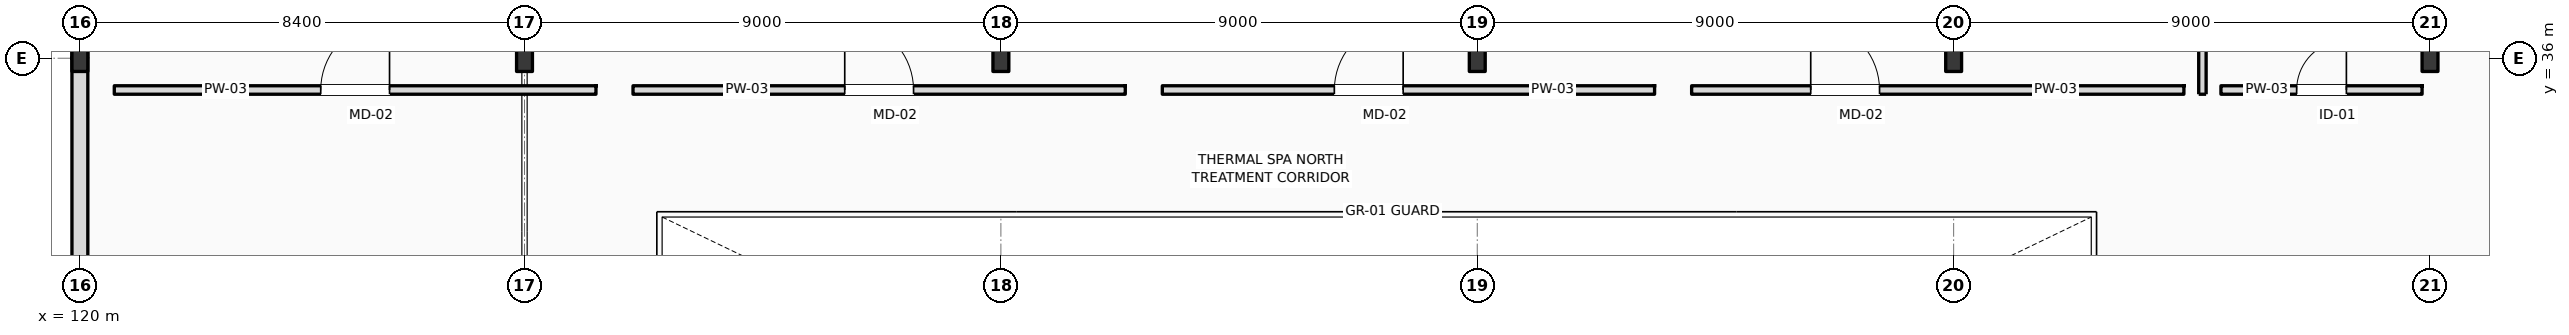
"""IFC4 building model, lengths in metres.
Left out: names, types, materials, properties, quantities, classifications, styles, units other than length and angle.
Written with IfcOpenShell. Run it as: python <this file> out.ifc"""

import sys

from ifc_helpers import new_model, si_unit, direction, frame, frame_2d, origin, origin_2d, place, context, subcontext, project, spatial, rectangle, i_section, extrude, element, fill, save


model = new_model("IFC4")
c1 = context("Model", 3, precision=1e-05, world=origin(), true_north=direction((0.0, 1.0)))
c2 = subcontext(c1, "Body", "Model", "MODEL_VIEW")
j1 = project(units=[si_unit("LENGTHUNIT", "METRE"), si_unit("PLANEANGLEUNIT", "RADIAN")], contexts=[c1])
p1 = place(None, origin())
s1 = spatial("IfcSite", under=j1, at=p1, CompositionType="ELEMENT")
p2 = place(p1, origin())
s2 = spatial("IfcBuilding", under=s1, at=p2, CompositionType="ELEMENT")
p3 = place(p2, frame((0.0, 0.0, 6.0)))
s3 = spatial("IfcBuildingStorey", under=s2, at=p3, CompositionType="ELEMENT", Elevation=6.0)
for number, where, z_axis, x_axis in (
    (1, (120.0, 36.0, 0.0), (0.0, 0.0, 1.0), (1.0, 0.0, 0.0)),
    (2, (128.4, 36.0, 0.0), (0.0, 0.0, 1.0), (1.0, 0.0, 0.0)),
    (3, (137.4, 36.0, 0.0), (0.0, 0.0, 1.0), (1.0, 0.0, 0.0)),
    (4, (146.4, 36.0, 0.0), (0.0, 0.0, 1.0), (1.0, 0.0, 0.0)),
    (5, (155.4, 36.0, 0.0), (0.0, 0.0, 1.0), (1.0, 0.0, 0.0)),
    (6, (164.4, 36.0, 0.0), (0.0, 0.0, 1.0), (1.0, 0.0, 0.0)),
):
    element("IfcColumn", number, at=place(p3, frame(where, z_axis=z_axis, x_axis=x_axis)), inside=s3, PredefinedType="COLUMN", context=c2, shape_type="SweptSolid", body=[
        extrude(i_section(OverallWidth=0.3, OverallDepth=0.5, WebThickness=0.014, FlangeThickness=0.028, FilletRadius=0.027, at=origin_2d()), origin(), (0.0, 0.0, 1.0), 5.4),
    ])
for number, where, z_axis, x_axis in (
    (7, (120.0, 27.0, 0.0), (0.0, 0.0, 1.0), (0.0, 1.0, 0.0)),
    (8, (120.0, 36.0, 0.0), (0.0, 0.0, 1.0), (0.0, 1.0, 0.0)),
):
    element("IfcWall", number, at=place(p3, frame(where, z_axis=z_axis, x_axis=x_axis)), inside=s3, PredefinedType="STANDARD", context=c2, shape_type="SweptSolid", body=[
        extrude(rectangle(XDim=9.0, YDim=0.3, at=frame_2d((4.5, 0.0))), origin(), (0.0, 0.0, 1.0), 4.55),
    ])
p4 = place(p3, frame((120.65, 35.4, 0.0), z_axis=(0.0, 0.0, 1.0), x_axis=(1.0, 0.0, 0.0)))
e9 = element("IfcWall", 9, at=p4, inside=s3, PredefinedType="PARTITIONING", context=c2, shape_type="SweptSolid", body=[
    extrude(rectangle(XDim=9.1, YDim=0.16, at=frame_2d((4.55, 0.0))), origin(), (0.0, 0.0, 1.0), 5.05),
])
p5 = place(p4, frame((3.9, 0.0, 0.0)))
e10 = element("IfcOpeningElement", 10, at=p5, cuts=e9, PredefinedType="OPENING", context=c2, shape_type="SweptSolid", body=[
    extrude(rectangle(XDim=1.3, YDim=2.2, at=frame_2d((0.65, 1.1))), frame((0.0, 0.09, 0.0), z_axis=(0.0, -1.0, 0.0), x_axis=(1.0, 0.0, 0.0)), (0.0, 0.0, 1.0), 0.18),
])
p6 = place(p3, frame((130.45, 35.4, 0.0), z_axis=(0.0, 0.0, 1.0), x_axis=(1.0, 0.0, 0.0)))
e11 = element("IfcWall", 11, at=p6, inside=s3, PredefinedType="PARTITIONING", context=c2, shape_type="SweptSolid", body=[
    extrude(rectangle(XDim=9.3, YDim=0.16, at=frame_2d((4.65, 0.0))), origin(), (0.0, 0.0, 1.0), 5.05),
])
p7 = place(p6, frame((4.0, 0.0, 0.0)))
e12 = element("IfcOpeningElement", 12, at=p7, cuts=e11, PredefinedType="OPENING", context=c2, shape_type="SweptSolid", body=[
    extrude(rectangle(XDim=1.3, YDim=2.2, at=frame_2d((0.65, 1.1))), frame((0.0, 0.09, 0.0), z_axis=(0.0, -1.0, 0.0), x_axis=(1.0, 0.0, 0.0)), (0.0, 0.0, 1.0), 0.18),
])
p8 = place(p3, frame((140.45, 35.4, 0.0), z_axis=(0.0, 0.0, 1.0), x_axis=(1.0, 0.0, 0.0)))
e13 = element("IfcWall", 13, at=p8, inside=s3, PredefinedType="PARTITIONING", context=c2, shape_type="SweptSolid", body=[
    extrude(rectangle(XDim=9.3, YDim=0.16, at=frame_2d((4.65, 0.0))), origin(), (0.0, 0.0, 1.0), 5.05),
])
p9 = place(p8, frame((3.25, 0.0, 0.0)))
e14 = element("IfcOpeningElement", 14, at=p9, cuts=e13, PredefinedType="OPENING", context=c2, shape_type="SweptSolid", body=[
    extrude(rectangle(XDim=1.3, YDim=2.2, at=frame_2d((0.65, 1.1))), frame((0.0, 0.09, 0.0), z_axis=(0.0, -1.0, 0.0), x_axis=(1.0, 0.0, 0.0)), (0.0, 0.0, 1.0), 0.18),
])
p10 = place(p3, frame((150.45, 35.4, 0.0), z_axis=(0.0, 0.0, 1.0), x_axis=(1.0, 0.0, 0.0)))
e15 = element("IfcWall", 15, at=p10, inside=s3, PredefinedType="PARTITIONING", context=c2, shape_type="SweptSolid", body=[
    extrude(rectangle(XDim=9.3, YDim=0.16, at=frame_2d((4.65, 0.0))), origin(), (0.0, 0.0, 1.0), 5.05),
])
p11 = place(p10, frame((2.25, 0.0, 0.0)))
e16 = element("IfcOpeningElement", 16, at=p11, cuts=e15, PredefinedType="OPENING", context=c2, shape_type="SweptSolid", body=[
    extrude(rectangle(XDim=1.3, YDim=2.2, at=frame_2d((0.65, 1.1))), frame((0.0, 0.09, 0.0), z_axis=(0.0, -1.0, 0.0), x_axis=(1.0, 0.0, 0.0)), (0.0, 0.0, 1.0), 0.18),
])
p12 = place(p3, frame((160.45, 35.4, 0.0), z_axis=(0.0, 0.0, 1.0), x_axis=(1.0, 0.0, 0.0)))
e17 = element("IfcWall", 17, at=p12, inside=s3, PredefinedType="PARTITIONING", context=c2, shape_type="SweptSolid", body=[
    extrude(rectangle(XDim=3.8, YDim=0.16, at=frame_2d((1.9, 0.0))), origin(), (0.0, 0.0, 1.0), 5.05),
])
p13 = place(p12, frame((1.43, 0.0, 0.0)))
e18 = element("IfcOpeningElement", 18, at=p13, cuts=e17, PredefinedType="OPENING", context=c2, shape_type="SweptSolid", body=[
    extrude(rectangle(XDim=0.94, YDim=2.15, at=frame_2d((0.47, 1.075))), frame((0.0, 0.09, 0.0), z_axis=(0.0, -1.0, 0.0), x_axis=(1.0, 0.0, 0.0)), (0.0, 0.0, 1.0), 0.18),
])
p14 = place(p3, frame((160.1, 35.32, 0.0), z_axis=(0.0, 0.0, 1.0), x_axis=(0.0, 1.0, 0.0)))
e19 = element("IfcWall", 19, at=p14, inside=s3, PredefinedType="PARTITIONING", context=c2, shape_type="SweptSolid", body=[
    extrude(rectangle(XDim=5.53, YDim=0.14, at=frame_2d((2.765, 0.0))), origin(), (0.0, 0.0, 1.0), 5.05),
])
p15 = place(p5, origin())
e20 = element("IfcDoor", 20, at=p15, inside=s3, OperationType="SINGLE_SWING_RIGHT", PredefinedType="DOOR", context=c2, shape_type="SweptSolid", body=[
    extrude(rectangle(XDim=1.3, YDim=2.2, at=frame_2d((0.65, 1.1))), frame((0.0, 0.025, 0.0), z_axis=(0.0, -1.0, 0.0), x_axis=(1.0, 0.0, 0.0)), (0.0, 0.0, 1.0), 0.05),
])
fill(e10, e20)
p16 = place(p7, origin())
e21 = element("IfcDoor", 21, at=p16, inside=s3, OperationType="SINGLE_SWING_LEFT", PredefinedType="DOOR", context=c2, shape_type="SweptSolid", body=[
    extrude(rectangle(XDim=1.3, YDim=2.2, at=frame_2d((0.65, 1.1))), frame((0.0, 0.025, 0.0), z_axis=(0.0, -1.0, 0.0), x_axis=(1.0, 0.0, 0.0)), (0.0, 0.0, 1.0), 0.05),
])
fill(e12, e21)
p17 = place(p9, origin())
e22 = element("IfcDoor", 22, at=p17, inside=s3, OperationType="SINGLE_SWING_RIGHT", PredefinedType="DOOR", context=c2, shape_type="SweptSolid", body=[
    extrude(rectangle(XDim=1.3, YDim=2.2, at=frame_2d((0.65, 1.1))), frame((0.0, 0.025, 0.0), z_axis=(0.0, -1.0, 0.0), x_axis=(1.0, 0.0, 0.0)), (0.0, 0.0, 1.0), 0.05),
])
fill(e14, e22)
p18 = place(p11, origin())
e23 = element("IfcDoor", 23, at=p18, inside=s3, OperationType="SINGLE_SWING_LEFT", PredefinedType="DOOR", context=c2, shape_type="SweptSolid", body=[
    extrude(rectangle(XDim=1.3, YDim=2.2, at=frame_2d((0.65, 1.1))), frame((0.0, 0.025, 0.0), z_axis=(0.0, -1.0, 0.0), x_axis=(1.0, 0.0, 0.0)), (0.0, 0.0, 1.0), 0.05),
])
fill(e16, e23)
p19 = place(p13, origin())
e24 = element("IfcDoor", 24, at=p19, inside=s3, OperationType="SINGLE_SWING_RIGHT", PredefinedType="DOOR", context=c2, shape_type="SweptSolid", body=[
    extrude(rectangle(XDim=0.94, YDim=2.15, at=frame_2d((0.47, 1.075))), frame((0.0, 0.025, 0.0), z_axis=(0.0, -1.0, 0.0), x_axis=(1.0, 0.0, 0.0)), (0.0, 0.0, 1.0), 0.05),
])
fill(e18, e24)
save(model, sys.argv[1])
